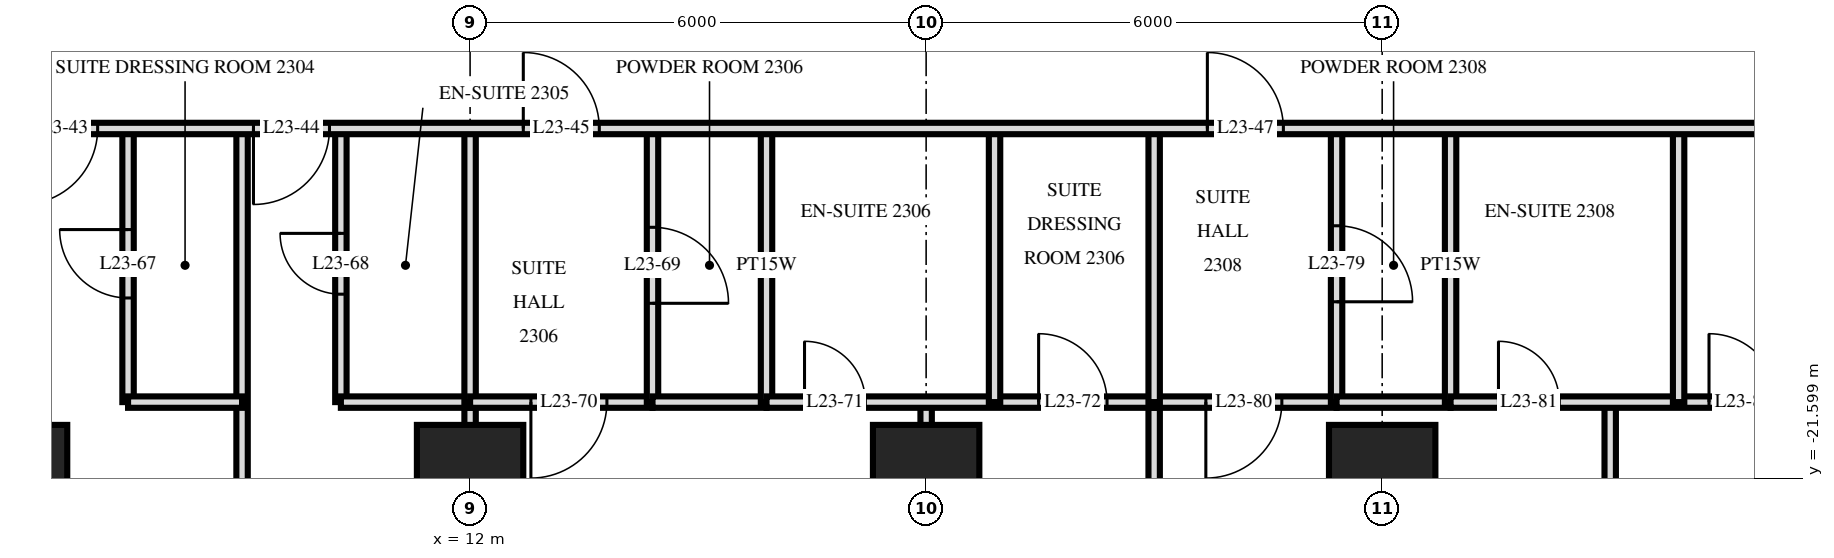
"""IFC4 building model, lengths in metres.
Left out: names, types, materials, properties, quantities, classifications, styles, units other than length and angle.
Written with IfcOpenShell. Run it as: python <this file> out.ifc"""

import sys

from ifc_helpers import new_model, si_unit, direction, frame, frame_2d, origin, origin_2d, place, context, subcontext, project, spatial, rectangle, extrude, element, fill, save


model = new_model("IFC4")
c1 = context("Model", 3, precision=1e-05, world=origin(), true_north=direction((0.0, 1.0)))
c2 = subcontext(c1, "Body", "Model", "MODEL_VIEW")
j1 = project(units=[si_unit("LENGTHUNIT", "METRE"), si_unit("PLANEANGLEUNIT", "RADIAN")], contexts=[c1])
p1 = place(None, origin())
s1 = spatial("IfcSite", under=j1, at=p1, CompositionType="ELEMENT")
p2 = place(p1, origin())
s2 = spatial("IfcBuilding", under=s1, at=p2, CompositionType="ELEMENT")
p3 = place(p2, frame((0.0, 0.0, 92.4)))
s3 = spatial("IfcBuildingStorey", under=s2, at=p3, CompositionType="ELEMENT", Elevation=92.4)
for number, where, z_axis, x_axis in (
    (1, (6.0, -21.6, 0.0), (0.0, 0.0, 1.0), (1.0, 0.0, 0.0)),
    (2, (12.0, -21.6, 0.0), (0.0, 0.0, 1.0), (1.0, 0.0, 0.0)),
    (3, (18.0, -21.6, 0.0), (0.0, 0.0, 1.0), (1.0, 0.0, 0.0)),
    (4, (24.0, -21.6, 0.0), (0.0, 0.0, 1.0), (1.0, 0.0, 0.0)),
):
    element("IfcColumn", number, at=place(p3, frame(where, z_axis=z_axis, x_axis=x_axis)), inside=s3, PredefinedType="COLUMN", context=c2, shape_type="SweptSolid", body=[
        extrude(rectangle(XDim=1.4, YDim=1.4, at=origin_2d()), origin(), (0.0, 0.0, 1.0), 3.6),
    ])
p4 = place(p3, frame((27.9, -20.6, 0.0), z_axis=(0.0, 0.0, 1.0), x_axis=(0.0, 1.0, 0.0)))
e5 = element("IfcWall", 5, at=p4, inside=s3, PredefinedType="PARTITIONING", context=c2, shape_type="SweptSolid", body=[
    extrude(rectangle(XDim=3.6, YDim=0.15, at=frame_2d((1.8, 0.0))), origin(), (0.0, 0.0, 1.0), 3.32),
])
p5 = place(p3, frame((27.0, -29.22, 0.0), z_axis=(0.0, 0.0, 1.0), x_axis=(0.0, 1.0, 0.0)))
e6 = element("IfcWall", 6, at=p5, inside=s3, PredefinedType="PARTITIONING", context=c2, shape_type="SweptSolid", body=[
    extrude(rectangle(XDim=8.62, YDim=0.15, at=frame_2d((4.31, 0.0))), origin(), (0.0, 0.0, 1.0), 3.32),
])
p6 = place(p5, frame((3.77, 0.0, 0.0)))
e7 = element("IfcOpeningElement", 7, at=p6, cuts=e6, PredefinedType="OPENING", context=c2, shape_type="SweptSolid", body=[
    extrude(rectangle(XDim=0.9, YDim=2.1, at=frame_2d((0.45, 1.05))), frame((0.0, 0.085, 0.0), z_axis=(0.0, -1.0, 0.0), x_axis=(1.0, 0.0, 0.0)), (0.0, 0.0, 1.0), 0.17),
])
p7 = place(p3, frame((24.9, -20.6, 0.0), z_axis=(0.0, 0.0, 1.0), x_axis=(0.0, 1.0, 0.0)))
e8 = element("IfcWall", 8, at=p7, inside=s3, PredefinedType="PLUMBINGWALL", context=c2, shape_type="SweptSolid", body=[
    extrude(rectangle(XDim=3.6, YDim=0.15, at=frame_2d((1.8, 0.0))), origin(), (0.0, 0.0, 1.0), 3.32),
])
p8 = place(p3, frame((23.4, -20.6, 0.0), z_axis=(0.0, 0.0, 1.0), x_axis=(0.0, 1.0, 0.0)))
e9 = element("IfcWall", 9, at=p8, inside=s3, PredefinedType="PARTITIONING", context=c2, shape_type="SweptSolid", body=[
    extrude(rectangle(XDim=3.6, YDim=0.15, at=frame_2d((1.8, 0.0))), origin(), (0.0, 0.0, 1.0), 3.32),
])
p9 = place(p8, frame((1.32, 0.0, 0.0)))
e10 = element("IfcOpeningElement", 10, at=p9, cuts=e9, PredefinedType="OPENING", context=c2, shape_type="SweptSolid", body=[
    extrude(rectangle(XDim=1.0, YDim=2.1, at=frame_2d((0.5, 1.05))), frame((0.0, 0.085, 0.0), z_axis=(0.0, -1.0, 0.0), x_axis=(1.0, 0.0, 0.0)), (0.0, 0.0, 1.0), 0.17),
])
p10 = place(p3, frame((21.0, -20.6, 0.0), z_axis=(0.0, 0.0, 1.0), x_axis=(0.0, 1.0, 0.0)))
e11 = element("IfcWall", 11, at=p10, inside=s3, PredefinedType="PARTITIONING", context=c2, shape_type="SweptSolid", body=[
    extrude(rectangle(XDim=3.6, YDim=0.15, at=frame_2d((1.8, 0.0))), origin(), (0.0, 0.0, 1.0), 3.32),
])
p11 = place(p3, frame((21.0, -29.22, 0.0), z_axis=(0.0, 0.0, 1.0), x_axis=(0.0, 1.0, 0.0)))
e12 = element("IfcWall", 12, at=p11, inside=s3, PredefinedType="PARTITIONING", context=c2, shape_type="SweptSolid", body=[
    extrude(rectangle(XDim=8.62, YDim=0.15, at=frame_2d((4.31, 0.0))), origin(), (0.0, 0.0, 1.0), 3.32),
])
p12 = place(p3, frame((18.9, -20.6, 0.0), z_axis=(0.0, 0.0, 1.0), x_axis=(0.0, 1.0, 0.0)))
e13 = element("IfcWall", 13, at=p12, inside=s3, PredefinedType="PARTITIONING", context=c2, shape_type="SweptSolid", body=[
    extrude(rectangle(XDim=3.6, YDim=0.15, at=frame_2d((1.8, 0.0))), origin(), (0.0, 0.0, 1.0), 3.32),
])
p13 = place(p3, frame((18.0, -29.22, 0.0), z_axis=(0.0, 0.0, 1.0), x_axis=(0.0, 1.0, 0.0)))
e14 = element("IfcWall", 14, at=p13, inside=s3, PredefinedType="PARTITIONING", context=c2, shape_type="SweptSolid", body=[
    extrude(rectangle(XDim=8.62, YDim=0.15, at=frame_2d((4.31, 0.0))), origin(), (0.0, 0.0, 1.0), 3.32),
])
p14 = place(p13, frame((3.75, 0.0, 0.0)))
e15 = element("IfcOpeningElement", 15, at=p14, cuts=e14, PredefinedType="OPENING", context=c2, shape_type="SweptSolid", body=[
    extrude(rectangle(XDim=0.9, YDim=2.1, at=frame_2d((0.45, 1.05))), frame((0.0, 0.085, 0.0), z_axis=(0.0, -1.0, 0.0), x_axis=(1.0, 0.0, 0.0)), (0.0, 0.0, 1.0), 0.17),
])
p15 = place(p3, frame((15.9, -20.6, 0.0), z_axis=(0.0, 0.0, 1.0), x_axis=(0.0, 1.0, 0.0)))
e16 = element("IfcWall", 16, at=p15, inside=s3, PredefinedType="PLUMBINGWALL", context=c2, shape_type="SweptSolid", body=[
    extrude(rectangle(XDim=3.6, YDim=0.15, at=frame_2d((1.8, 0.0))), origin(), (0.0, 0.0, 1.0), 3.32),
])
p16 = place(p3, frame((14.4, -20.6, 0.0), z_axis=(0.0, 0.0, 1.0), x_axis=(0.0, 1.0, 0.0)))
e17 = element("IfcWall", 17, at=p16, inside=s3, PredefinedType="PARTITIONING", context=c2, shape_type="SweptSolid", body=[
    extrude(rectangle(XDim=3.6, YDim=0.15, at=frame_2d((1.8, 0.0))), origin(), (0.0, 0.0, 1.0), 3.32),
])
p17 = place(p16, frame((1.3, 0.0, 0.0)))
e18 = element("IfcOpeningElement", 18, at=p17, cuts=e17, PredefinedType="OPENING", context=c2, shape_type="SweptSolid", body=[
    extrude(rectangle(XDim=1.0, YDim=2.1, at=frame_2d((0.5, 1.05))), frame((0.0, 0.085, 0.0), z_axis=(0.0, -1.0, 0.0), x_axis=(1.0, 0.0, 0.0)), (0.0, 0.0, 1.0), 0.17),
])
p18 = place(p3, frame((12.0, -20.6, 0.0), z_axis=(0.0, 0.0, 1.0), x_axis=(0.0, 1.0, 0.0)))
e19 = element("IfcWall", 19, at=p18, inside=s3, PredefinedType="PARTITIONING", context=c2, shape_type="SweptSolid", body=[
    extrude(rectangle(XDim=3.6, YDim=0.15, at=frame_2d((1.8, 0.0))), origin(), (0.0, 0.0, 1.0), 3.32),
])
p19 = place(p3, frame((12.0, -29.22, 0.0), z_axis=(0.0, 0.0, 1.0), x_axis=(0.0, 1.0, 0.0)))
e20 = element("IfcWall", 20, at=p19, inside=s3, PredefinedType="PARTITIONING", context=c2, shape_type="SweptSolid", body=[
    extrude(rectangle(XDim=8.62, YDim=0.15, at=frame_2d((4.31, 0.0))), origin(), (0.0, 0.0, 1.0), 3.32),
])
p20 = place(p3, frame((10.3, -20.6, 0.0), z_axis=(0.0, 0.0, 1.0), x_axis=(0.0, 1.0, 0.0)))
e21 = element("IfcWall", 21, at=p20, inside=s3, PredefinedType="PARTITIONING", context=c2, shape_type="SweptSolid", body=[
    extrude(rectangle(XDim=3.6, YDim=0.15, at=frame_2d((1.8, 0.0))), origin(), (0.0, 0.0, 1.0), 3.32),
])
p21 = place(p20, frame((1.42, 0.0, 0.0)))
e22 = element("IfcOpeningElement", 22, at=p21, cuts=e21, PredefinedType="OPENING", context=c2, shape_type="SweptSolid", body=[
    extrude(rectangle(XDim=0.8, YDim=2.1, at=frame_2d((0.4, 1.05))), frame((0.0, 0.085, 0.0), z_axis=(0.0, -1.0, 0.0), x_axis=(1.0, 0.0, 0.0)), (0.0, 0.0, 1.0), 0.17),
])
p22 = place(p3, frame((9.0, -29.22, 0.0), z_axis=(0.0, 0.0, 1.0), x_axis=(0.0, 1.0, 0.0)))
e23 = element("IfcWall", 23, at=p22, inside=s3, PredefinedType="PARTITIONING", context=c2, shape_type="SweptSolid", body=[
    extrude(rectangle(XDim=12.22, YDim=0.15, at=frame_2d((6.11, 0.0))), origin(), (0.0, 0.0, 1.0), 3.32),
])
p23 = place(p3, frame((7.5, -20.6, 0.0), z_axis=(0.0, 0.0, 1.0), x_axis=(0.0, 1.0, 0.0)))
e24 = element("IfcWall", 24, at=p23, inside=s3, PredefinedType="PARTITIONING", context=c2, shape_type="SweptSolid", body=[
    extrude(rectangle(XDim=3.6, YDim=0.15, at=frame_2d((1.8, 0.0))), origin(), (0.0, 0.0, 1.0), 3.32),
])
p24 = place(p23, frame((1.37, 0.0, 0.0)))
e25 = element("IfcOpeningElement", 25, at=p24, cuts=e24, PredefinedType="OPENING", context=c2, shape_type="SweptSolid", body=[
    extrude(rectangle(XDim=0.9, YDim=2.1, at=frame_2d((0.45, 1.05))), frame((0.0, 0.085, 0.0), z_axis=(0.0, -1.0, 0.0), x_axis=(1.0, 0.0, 0.0)), (0.0, 0.0, 1.0), 0.17),
])
p25 = place(p3, frame((12.0, -20.6, 0.0), z_axis=(0.0, 0.0, 1.0), x_axis=(1.0, 0.0, 0.0)))
e26 = element("IfcWall", 26, at=p25, inside=s3, PredefinedType="PARTITIONING", context=c2, shape_type="SweptSolid", body=[
    extrude(rectangle(XDim=2.4, YDim=0.15, at=frame_2d((1.2, 0.0))), origin(), (0.0, 0.0, 1.0), 3.32),
])
p26 = place(p25, frame((0.8, 0.0, 0.0)))
e27 = element("IfcOpeningElement", 27, at=p26, cuts=e26, PredefinedType="OPENING", context=c2, shape_type="SweptSolid", body=[
    extrude(rectangle(XDim=1.0, YDim=2.1, at=frame_2d((0.5, 1.05))), frame((0.0, 0.085, 0.0), z_axis=(0.0, -1.0, 0.0), x_axis=(1.0, 0.0, 0.0)), (0.0, 0.0, 1.0), 0.17),
])
p27 = place(p3, frame((21.0, -20.6, 0.0), z_axis=(0.0, 0.0, 1.0), x_axis=(1.0, 0.0, 0.0)))
e28 = element("IfcWall", 28, at=p27, inside=s3, PredefinedType="PARTITIONING", context=c2, shape_type="SweptSolid", body=[
    extrude(rectangle(XDim=2.4, YDim=0.15, at=frame_2d((1.2, 0.0))), origin(), (0.0, 0.0, 1.0), 3.32),
])
p28 = place(p27, frame((0.68, 0.0, 0.0)))
e29 = element("IfcOpeningElement", 29, at=p28, cuts=e28, PredefinedType="OPENING", context=c2, shape_type="SweptSolid", body=[
    extrude(rectangle(XDim=1.0, YDim=2.1, at=frame_2d((0.5, 1.05))), frame((0.0, 0.085, 0.0), z_axis=(0.0, -1.0, 0.0), x_axis=(1.0, 0.0, 0.0)), (0.0, 0.0, 1.0), 0.17),
])
p29 = place(p3, frame((7.5, -20.6, 0.0), z_axis=(0.0, 0.0, 1.0), x_axis=(1.0, 0.0, 0.0)))
e30 = element("IfcWall", 30, at=p29, inside=s3, PredefinedType="PARTITIONING", context=c2, shape_type="SweptSolid", body=[
    extrude(rectangle(XDim=1.5, YDim=0.15, at=frame_2d((0.75, 0.0))), origin(), (0.0, 0.0, 1.0), 3.32),
])
p30 = place(p3, frame((10.3, -20.6, 0.0), z_axis=(0.0, 0.0, 1.0), x_axis=(1.0, 0.0, 0.0)))
e31 = element("IfcWall", 31, at=p30, inside=s3, PredefinedType="PARTITIONING", context=c2, shape_type="SweptSolid", body=[
    extrude(rectangle(XDim=1.7, YDim=0.15, at=frame_2d((0.85, 0.0))), origin(), (0.0, 0.0, 1.0), 3.32),
])
p31 = place(p3, frame((15.9, -20.6, 0.0), z_axis=(0.0, 0.0, 1.0), x_axis=(1.0, 0.0, 0.0)))
e32 = element("IfcWall", 32, at=p31, inside=s3, PredefinedType="PARTITIONING", context=c2, shape_type="SweptSolid", body=[
    extrude(rectangle(XDim=5.1, YDim=0.15, at=frame_2d((2.55, 0.0))), origin(), (0.0, 0.0, 1.0), 3.32),
])
p32 = place(p31, frame((0.5, 0.0, 0.0)))
e33 = element("IfcOpeningElement", 33, at=p32, cuts=e32, PredefinedType="OPENING", context=c2, shape_type="SweptSolid", body=[
    extrude(rectangle(XDim=0.8, YDim=2.1, at=frame_2d((0.4, 1.05))), frame((0.0, 0.085, 0.0), z_axis=(0.0, -1.0, 0.0), x_axis=(1.0, 0.0, 0.0)), (0.0, 0.0, 1.0), 0.17),
])
p33 = place(p31, frame((3.58, 0.0, 0.0)))
e34 = element("IfcOpeningElement", 34, at=p33, cuts=e32, PredefinedType="OPENING", context=c2, shape_type="SweptSolid", body=[
    extrude(rectangle(XDim=0.9, YDim=2.1, at=frame_2d((0.45, 1.05))), frame((0.0, 0.085, 0.0), z_axis=(0.0, -1.0, 0.0), x_axis=(1.0, 0.0, 0.0)), (0.0, 0.0, 1.0), 0.17),
])
p34 = place(p3, frame((24.9, -20.6, 0.0), z_axis=(0.0, 0.0, 1.0), x_axis=(1.0, 0.0, 0.0)))
e35 = element("IfcWall", 35, at=p34, inside=s3, PredefinedType="PARTITIONING", context=c2, shape_type="SweptSolid", body=[
    extrude(rectangle(XDim=8.22, YDim=0.15, at=frame_2d((4.11, 0.0))), origin(), (0.0, 0.0, 1.0), 3.32),
])
p35 = place(p34, frame((0.63, 0.0, 0.0)))
e36 = element("IfcOpeningElement", 36, at=p35, cuts=e35, PredefinedType="OPENING", context=c2, shape_type="SweptSolid", body=[
    extrude(rectangle(XDim=0.8, YDim=2.1, at=frame_2d((0.4, 1.05))), frame((0.0, 0.085, 0.0), z_axis=(0.0, -1.0, 0.0), x_axis=(1.0, 0.0, 0.0)), (0.0, 0.0, 1.0), 0.17),
])
p36 = place(p34, frame((3.4, 0.0, 0.0)))
e37 = element("IfcOpeningElement", 37, at=p36, cuts=e35, PredefinedType="OPENING", context=c2, shape_type="SweptSolid", body=[
    extrude(rectangle(XDim=0.9, YDim=2.1, at=frame_2d((0.45, 1.05))), frame((0.0, 0.085, 0.0), z_axis=(0.0, -1.0, 0.0), x_axis=(1.0, 0.0, 0.0)), (0.0, 0.0, 1.0), 0.17),
])
for number, where, z_axis, x_axis in (
    (38, (14.4, -20.6, 0.0), (0.0, 0.0, 1.0), (1.0, 0.0, 0.0)),
    (39, (23.4, -20.6, 0.0), (0.0, 0.0, 1.0), (1.0, 0.0, 0.0)),
):
    element("IfcWall", number, at=place(p3, frame(where, z_axis=z_axis, x_axis=x_axis)), inside=s3, PredefinedType="PLUMBINGWALL", context=c2, shape_type="SweptSolid", body=[
        extrude(rectangle(XDim=1.5, YDim=0.15, at=frame_2d((0.75, 0.0))), origin(), (0.0, 0.0, 1.0), 3.32),
    ])
p37 = place(p3, frame((-33.12, -17.0, 0.0), z_axis=(0.0, 0.0, 1.0), x_axis=(1.0, 0.0, 0.0)))
e40 = element("IfcWall", 40, at=p37, inside=s3, PredefinedType="PARTITIONING", context=c2, shape_type="SweptSolid", body=[
    extrude(rectangle(XDim=66.24, YDim=0.15, at=frame_2d((33.12, 0.0))), origin(), (0.0, 0.0, 1.0), 3.32),
])
p38 = place(p37, frame((16.27, 0.0, 0.0)))
e41 = element("IfcOpeningElement", 41, at=p38, cuts=e40, PredefinedType="OPENING", context=c2, shape_type="SweptSolid", body=[
    extrude(rectangle(XDim=1.0, YDim=2.1, at=frame_2d((0.5, 1.05))), frame((0.0, 0.085, 0.0), z_axis=(0.0, -1.0, 0.0), x_axis=(1.0, 0.0, 0.0)), (0.0, 0.0, 1.0), 0.17),
])
p39 = place(p37, frame((22.97, 0.0, 0.0)))
e42 = element("IfcOpeningElement", 42, at=p39, cuts=e40, PredefinedType="OPENING", context=c2, shape_type="SweptSolid", body=[
    extrude(rectangle(XDim=1.0, YDim=2.1, at=frame_2d((0.5, 1.05))), frame((0.0, 0.085, 0.0), z_axis=(0.0, -1.0, 0.0), x_axis=(1.0, 0.0, 0.0)), (0.0, 0.0, 1.0), 0.17),
])
p40 = place(p37, frame((34.42, 0.0, 0.0)))
e43 = element("IfcOpeningElement", 43, at=p40, cuts=e40, PredefinedType="OPENING", context=c2, shape_type="SweptSolid", body=[
    extrude(rectangle(XDim=1.0, YDim=2.1, at=frame_2d((0.5, 1.05))), frame((0.0, 0.085, 0.0), z_axis=(0.0, -1.0, 0.0), x_axis=(1.0, 0.0, 0.0)), (0.0, 0.0, 1.0), 0.17),
])
p41 = place(p37, frame((39.22, 0.0, 0.0)))
e44 = element("IfcOpeningElement", 44, at=p41, cuts=e40, PredefinedType="OPENING", context=c2, shape_type="SweptSolid", body=[
    extrude(rectangle(XDim=1.0, YDim=2.1, at=frame_2d((0.5, 1.05))), frame((0.0, 0.085, 0.0), z_axis=(0.0, -1.0, 0.0), x_axis=(1.0, 0.0, 0.0)), (0.0, 0.0, 1.0), 0.17),
])
p42 = place(p37, frame((42.27, 0.0, 0.0)))
e45 = element("IfcOpeningElement", 45, at=p42, cuts=e40, PredefinedType="OPENING", context=c2, shape_type="SweptSolid", body=[
    extrude(rectangle(XDim=1.0, YDim=2.1, at=frame_2d((0.5, 1.05))), frame((0.0, 0.085, 0.0), z_axis=(0.0, -1.0, 0.0), x_axis=(1.0, 0.0, 0.0)), (0.0, 0.0, 1.0), 0.17),
])
p43 = place(p37, frame((45.82, 0.0, 0.0)))
e46 = element("IfcOpeningElement", 46, at=p43, cuts=e40, PredefinedType="OPENING", context=c2, shape_type="SweptSolid", body=[
    extrude(rectangle(XDim=1.0, YDim=2.1, at=frame_2d((0.5, 1.05))), frame((0.0, 0.085, 0.0), z_axis=(0.0, -1.0, 0.0), x_axis=(1.0, 0.0, 0.0)), (0.0, 0.0, 1.0), 0.17),
])
p44 = place(p37, frame((13.42, 0.0, 0.0)))
e47 = element("IfcOpeningElement", 47, at=p44, cuts=e40, PredefinedType="OPENING", context=c2, shape_type="SweptSolid", body=[
    extrude(rectangle(XDim=1.0, YDim=2.1, at=frame_2d((0.5, 1.05))), frame((0.0, 0.085, 0.0), z_axis=(0.0, -1.0, 0.0), x_axis=(1.0, 0.0, 0.0)), (0.0, 0.0, 1.0), 0.17),
])
p45 = place(p37, frame((54.82, 0.0, 0.0)))
e48 = element("IfcOpeningElement", 48, at=p45, cuts=e40, PredefinedType="OPENING", context=c2, shape_type="SweptSolid", body=[
    extrude(rectangle(XDim=1.0, YDim=2.1, at=frame_2d((0.5, 1.05))), frame((0.0, 0.085, 0.0), z_axis=(0.0, -1.0, 0.0), x_axis=(1.0, 0.0, 0.0)), (0.0, 0.0, 1.0), 0.17),
])
p46 = place(p41, frame((0.5, 0.0, 0.0), z_axis=(0.0, 0.0, 1.0), x_axis=(-1.0, 0.0, 0.0)))
e49 = element("IfcDoor", 49, at=p46, inside=s3, OperationType="SINGLE_SWING_LEFT", PredefinedType="DOOR", context=c2, shape_type="SweptSolid", body=[
    extrude(rectangle(XDim=1.0, YDim=2.1, at=frame_2d((0.0, 1.05))), frame((0.0, -0.025, 0.0), z_axis=(0.0, 1.0, 0.0), x_axis=(-1.0, 0.0, 0.0)), (0.0, 0.0, 1.0), 0.05),
])
fill(e44, e49)
p47 = place(p42, frame((0.5, 0.0, 0.0), z_axis=(0.0, 0.0, 1.0), x_axis=(-1.0, 0.0, 0.0)))
e50 = element("IfcDoor", 50, at=p47, inside=s3, OperationType="SINGLE_SWING_LEFT", PredefinedType="DOOR", context=c2, shape_type="SweptSolid", body=[
    extrude(rectangle(XDim=1.0, YDim=2.1, at=frame_2d((0.0, 1.05))), frame((0.0, -0.025, 0.0), z_axis=(0.0, 1.0, 0.0), x_axis=(-1.0, 0.0, 0.0)), (0.0, 0.0, 1.0), 0.05),
])
fill(e45, e50)
p48 = place(p43, origin())
e51 = element("IfcDoor", 51, at=p48, inside=s3, OperationType="SINGLE_SWING_RIGHT", PredefinedType="DOOR", context=c2, shape_type="SweptSolid", body=[
    extrude(rectangle(XDim=1.0, YDim=2.1, at=frame_2d((0.5, 1.05))), frame((0.0, 0.025, 0.0), z_axis=(0.0, -1.0, 0.0), x_axis=(1.0, 0.0, 0.0)), (0.0, 0.0, 1.0), 0.05),
])
fill(e46, e51)
p49 = place(p45, origin())
e52 = element("IfcDoor", 52, at=p49, inside=s3, OperationType="SINGLE_SWING_RIGHT", PredefinedType="DOOR", context=c2, shape_type="SweptSolid", body=[
    extrude(rectangle(XDim=1.0, YDim=2.1, at=frame_2d((0.5, 1.05))), frame((0.0, 0.025, 0.0), z_axis=(0.0, -1.0, 0.0), x_axis=(1.0, 0.0, 0.0)), (0.0, 0.0, 1.0), 0.05),
])
fill(e48, e52)
p50 = place(p24, origin())
e53 = element("IfcDoor", 53, at=p50, inside=s3, OperationType="SINGLE_SWING_LEFT", PredefinedType="DOOR", context=c2, shape_type="SweptSolid", body=[
    extrude(rectangle(XDim=0.9, YDim=2.1, at=frame_2d((0.45, 1.05))), frame((0.0, 0.025, 0.0), z_axis=(0.0, -1.0, 0.0), x_axis=(1.0, 0.0, 0.0)), (0.0, 0.0, 1.0), 0.05),
])
fill(e25, e53)
p51 = place(p21, origin())
e54 = element("IfcDoor", 54, at=p51, inside=s3, OperationType="SINGLE_SWING_LEFT", PredefinedType="DOOR", context=c2, shape_type="SweptSolid", body=[
    extrude(rectangle(XDim=0.8, YDim=2.1, at=frame_2d((0.4, 1.05))), frame((0.0, 0.025, 0.0), z_axis=(0.0, -1.0, 0.0), x_axis=(1.0, 0.0, 0.0)), (0.0, 0.0, 1.0), 0.05),
])
fill(e22, e54)
p52 = place(p17, frame((0.5, 0.0, 0.0), z_axis=(0.0, 0.0, 1.0), x_axis=(-1.0, 0.0, 0.0)))
e55 = element("IfcDoor", 55, at=p52, inside=s3, OperationType="SINGLE_SWING_LEFT", PredefinedType="DOOR", context=c2, shape_type="SweptSolid", body=[
    extrude(rectangle(XDim=1.0, YDim=2.1, at=frame_2d((0.0, 1.05))), frame((0.0, -0.025, 0.0), z_axis=(0.0, 1.0, 0.0), x_axis=(-1.0, 0.0, 0.0)), (0.0, 0.0, 1.0), 0.05),
])
fill(e18, e55)
p53 = place(p26, frame((0.5, 0.0, 0.0), z_axis=(0.0, 0.0, 1.0), x_axis=(-1.0, 0.0, 0.0)))
e56 = element("IfcDoor", 56, at=p53, inside=s3, OperationType="SINGLE_SWING_LEFT", PredefinedType="DOOR", context=c2, shape_type="SweptSolid", body=[
    extrude(rectangle(XDim=1.0, YDim=2.1, at=frame_2d((0.0, 1.05))), frame((0.0, -0.025, 0.0), z_axis=(0.0, 1.0, 0.0), x_axis=(-1.0, 0.0, 0.0)), (0.0, 0.0, 1.0), 0.05),
])
fill(e27, e56)
p54 = place(p32, origin())
e57 = element("IfcDoor", 57, at=p54, inside=s3, OperationType="SINGLE_SWING_RIGHT", PredefinedType="DOOR", context=c2, shape_type="SweptSolid", body=[
    extrude(rectangle(XDim=0.8, YDim=2.1, at=frame_2d((0.4, 1.05))), frame((0.0, 0.025, 0.0), z_axis=(0.0, -1.0, 0.0), x_axis=(1.0, 0.0, 0.0)), (0.0, 0.0, 1.0), 0.05),
])
fill(e33, e57)
p55 = place(p33, origin())
e58 = element("IfcDoor", 58, at=p55, inside=s3, OperationType="SINGLE_SWING_RIGHT", PredefinedType="DOOR", context=c2, shape_type="SweptSolid", body=[
    extrude(rectangle(XDim=0.9, YDim=2.1, at=frame_2d((0.45, 1.05))), frame((0.0, 0.025, 0.0), z_axis=(0.0, -1.0, 0.0), x_axis=(1.0, 0.0, 0.0)), (0.0, 0.0, 1.0), 0.05),
])
fill(e34, e58)
p56 = place(p9, frame((0.5, 0.0, 0.0), z_axis=(0.0, 0.0, 1.0), x_axis=(-1.0, 0.0, 0.0)))
e59 = element("IfcDoor", 59, at=p56, inside=s3, OperationType="SINGLE_SWING_LEFT", PredefinedType="DOOR", context=c2, shape_type="SweptSolid", body=[
    extrude(rectangle(XDim=1.0, YDim=2.1, at=frame_2d((0.0, 1.05))), frame((0.0, -0.025, 0.0), z_axis=(0.0, 1.0, 0.0), x_axis=(-1.0, 0.0, 0.0)), (0.0, 0.0, 1.0), 0.05),
])
fill(e10, e59)
p57 = place(p28, frame((0.5, 0.0, 0.0), z_axis=(0.0, 0.0, 1.0), x_axis=(-1.0, 0.0, 0.0)))
e60 = element("IfcDoor", 60, at=p57, inside=s3, OperationType="SINGLE_SWING_LEFT", PredefinedType="DOOR", context=c2, shape_type="SweptSolid", body=[
    extrude(rectangle(XDim=1.0, YDim=2.1, at=frame_2d((0.0, 1.05))), frame((0.0, -0.025, 0.0), z_axis=(0.0, 1.0, 0.0), x_axis=(-1.0, 0.0, 0.0)), (0.0, 0.0, 1.0), 0.05),
])
fill(e29, e60)
p58 = place(p35, origin())
e61 = element("IfcDoor", 61, at=p58, inside=s3, OperationType="SINGLE_SWING_RIGHT", PredefinedType="DOOR", context=c2, shape_type="SweptSolid", body=[
    extrude(rectangle(XDim=0.8, YDim=2.1, at=frame_2d((0.4, 1.05))), frame((0.0, 0.025, 0.0), z_axis=(0.0, -1.0, 0.0), x_axis=(1.0, 0.0, 0.0)), (0.0, 0.0, 1.0), 0.05),
])
fill(e36, e61)
p59 = place(p36, origin())
e62 = element("IfcDoor", 62, at=p59, inside=s3, OperationType="SINGLE_SWING_RIGHT", PredefinedType="DOOR", context=c2, shape_type="SweptSolid", body=[
    extrude(rectangle(XDim=0.9, YDim=2.1, at=frame_2d((0.45, 1.05))), frame((0.0, 0.025, 0.0), z_axis=(0.0, -1.0, 0.0), x_axis=(1.0, 0.0, 0.0)), (0.0, 0.0, 1.0), 0.05),
])
fill(e37, e62)
save(model, sys.argv[1])
